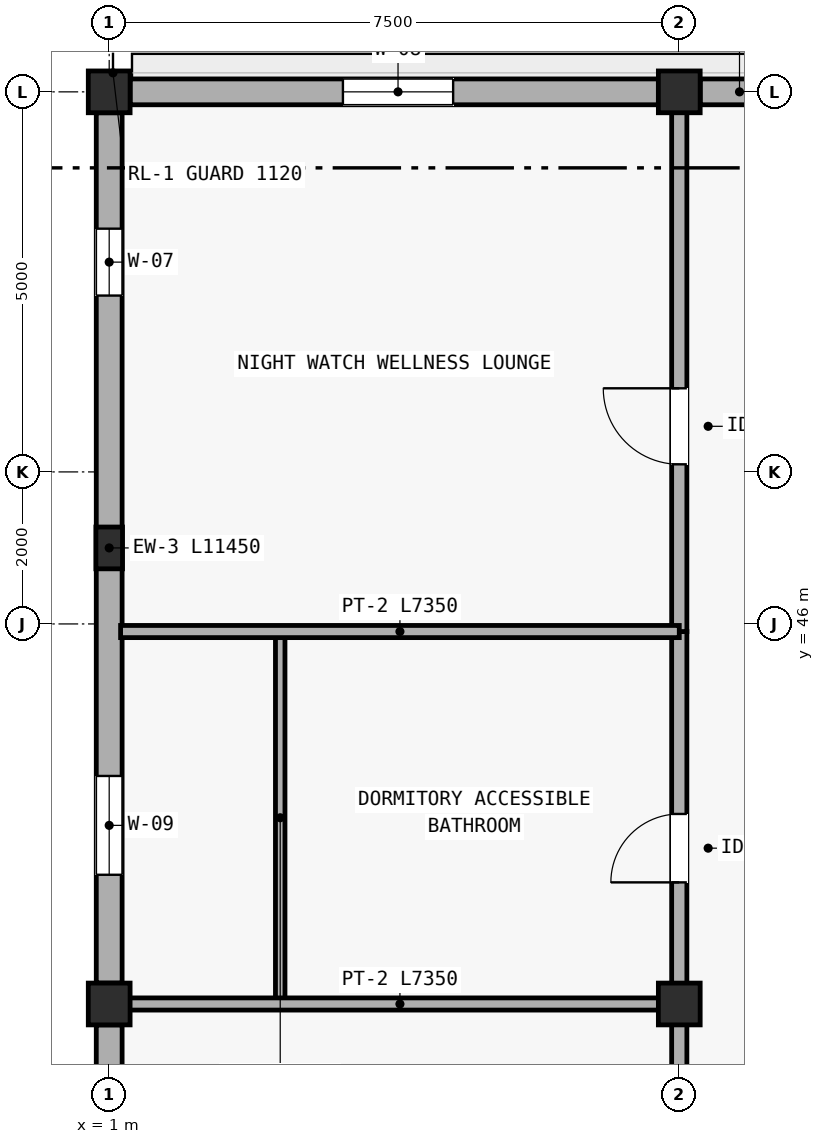
"""IFC4 building model, lengths in metres.
Left out: names, types, materials, properties, quantities, classifications, styles, units other than length and angle.
Written with IfcOpenShell. Run it as: python <this file> out.ifc"""

import sys

from ifc_helpers import new_model, si_unit, direction, frame, frame_2d, origin, origin_2d, place, context, subcontext, project, spatial, rectangle, extrude, element, fill, save


model = new_model("IFC4")
c1 = context("Model", 3, precision=1e-05, world=origin(), true_north=direction((0.0, 1.0)))
c2 = subcontext(c1, "Body", "Model", "MODEL_VIEW")
j1 = project(units=[si_unit("LENGTHUNIT", "METRE"), si_unit("PLANEANGLEUNIT", "RADIAN")], contexts=[c1])
p1 = place(None, origin())
s1 = spatial("IfcSite", under=j1, at=p1, CompositionType="ELEMENT")
p2 = place(p1, origin())
s2 = spatial("IfcBuilding", under=s1, at=p2, CompositionType="ELEMENT")
p3 = place(p2, frame((0.0, 0.0, 9.3)))
s3 = spatial("IfcBuildingStorey", under=s2, at=p3, CompositionType="ELEMENT", Elevation=9.3)
for number, where, z_axis, x_axis in (
    (1, (1.0, 41.0, 0.0), (0.0, 0.0, 1.0), (1.0, 0.0, 0.0)),
    (2, (1.0, 53.0, 0.0), (0.0, 0.0, 1.0), (1.0, 0.0, 0.0)),
    (3, (8.5, 41.0, 0.0), (0.0, 0.0, 1.0), (1.0, 0.0, 0.0)),
    (4, (8.5, 53.0, 0.0), (0.0, 0.0, 1.0), (1.0, 0.0, 0.0)),
):
    element("IfcColumn", number, at=place(p3, frame(where, z_axis=z_axis, x_axis=x_axis)), inside=s3, PredefinedType="COLUMN", context=c2, shape_type="SweptSolid", body=[
        extrude(rectangle(XDim=0.55, YDim=0.55, at=origin_2d()), origin(), (0.0, 0.0, 1.0), 3.45),
    ])
p4 = place(p3, frame((1.0, 47.0, 0.0), z_axis=(0.0, 0.0, 1.0), x_axis=(1.0, 0.0, 0.0)))
e5 = element("IfcColumn", 5, at=p4, inside=s3, PredefinedType="PILASTER", context=c2, shape_type="SweptSolid", body=[
    extrude(rectangle(XDim=0.35, YDim=0.55, at=origin_2d()), origin(), (0.0, 0.0, 1.0), 3.45),
])
p5 = place(p3, frame((8.225, 53.0, 0.0), z_axis=(0.0, 0.0, 1.0), x_axis=(-1.0, 0.0, 0.0)))
e6 = element("IfcWall", 6, at=p5, inside=s3, PredefinedType="STANDARD", context=c2, shape_type="SweptSolid", body=[
    extrude(rectangle(XDim=6.95, YDim=0.34, at=frame_2d((3.475, 0.0))), origin(), (0.0, 0.0, 1.0), 2.75),
])
p6 = place(p5, frame((2.7, 0.0, 0.75)))
e7 = element("IfcOpeningElement", 7, at=p6, cuts=e6, PredefinedType="OPENING", context=c2, shape_type="SweptSolid", body=[
    extrude(rectangle(XDim=1.45, YDim=1.25, at=frame_2d((0.725, 0.625))), frame((0.0, 0.18, 0.0), z_axis=(0.0, -1.0, 0.0), x_axis=(1.0, 0.0, 0.0)), (0.0, 0.0, 1.0), 0.36),
])
p7 = place(p3, frame((12.225, 53.0, 0.0), z_axis=(0.0, 0.0, 1.0), x_axis=(-1.0, 0.0, 0.0)))
e8 = element("IfcWall", 8, at=p7, inside=s3, PredefinedType="STANDARD", context=c2, shape_type="SweptSolid", body=[
    extrude(rectangle(XDim=3.45, YDim=0.34, at=frame_2d((1.725, 0.0))), origin(), (0.0, 0.0, 1.0), 2.75),
])
p8 = place(p7, frame((1.025, 0.0, 0.0)))
e9 = element("IfcOpeningElement", 9, at=p8, cuts=e8, PredefinedType="OPENING", context=c2, shape_type="SweptSolid", body=[
    extrude(rectangle(XDim=1.08, YDim=2.1, at=frame_2d((0.54, 1.05))), frame((0.0, 0.18, 0.0), z_axis=(0.0, -1.0, 0.0), x_axis=(1.0, 0.0, 0.0)), (0.0, 0.0, 1.0), 0.36),
])
p9 = place(p3, frame((1.0, 40.725, 0.0), z_axis=(0.0, 0.0, 1.0), x_axis=(0.0, -1.0, 0.0)))
e10 = element("IfcWall", 10, at=p9, inside=s3, PredefinedType="STANDARD", context=c2, shape_type="SweptSolid", body=[
    extrude(rectangle(XDim=11.45, YDim=0.34, at=frame_2d((5.725, 0.0))), origin(), (0.0, 0.0, 1.0), 2.75),
])
p10 = place(p9, frame((1.525, 0.0, 0.7)))
e11 = element("IfcOpeningElement", 11, at=p10, cuts=e10, PredefinedType="OPENING", context=c2, shape_type="SweptSolid", body=[
    extrude(rectangle(XDim=0.88, YDim=1.5, at=frame_2d((0.44, 0.75))), frame((0.0, 0.18, 0.0), z_axis=(0.0, -1.0, 0.0), x_axis=(1.0, 0.0, 0.0)), (0.0, 0.0, 1.0), 0.36),
])
p11 = place(p9, frame((8.725, 0.0, 0.7)))
e12 = element("IfcOpeningElement", 12, at=p11, cuts=e10, PredefinedType="OPENING", context=c2, shape_type="SweptSolid", body=[
    extrude(rectangle(XDim=1.3, YDim=1.4, at=frame_2d((0.65, 0.7))), frame((0.0, 0.18, 0.0), z_axis=(0.0, -1.0, 0.0), x_axis=(1.0, 0.0, 0.0)), (0.0, 0.0, 1.0), 0.36),
])
p12 = place(p3, frame((1.0, 52.725, 0.0), z_axis=(0.0, 0.0, 1.0), x_axis=(0.0, -1.0, 0.0)))
e13 = element("IfcWall", 13, at=p12, inside=s3, PredefinedType="STANDARD", context=c2, shape_type="SweptSolid", body=[
    extrude(rectangle(XDim=11.45, YDim=0.34, at=frame_2d((5.725, 0.0))), origin(), (0.0, 0.0, 1.0), 2.75),
])
p13 = place(p12, frame((1.525, 0.0, 0.7)))
e14 = element("IfcOpeningElement", 14, at=p13, cuts=e13, PredefinedType="OPENING", context=c2, shape_type="SweptSolid", body=[
    extrude(rectangle(XDim=0.88, YDim=1.5, at=frame_2d((0.44, 0.75))), frame((0.0, 0.18, 0.0), z_axis=(0.0, -1.0, 0.0), x_axis=(1.0, 0.0, 0.0)), (0.0, 0.0, 1.0), 0.36),
])
p14 = place(p12, frame((8.725, 0.0, 0.7)))
e15 = element("IfcOpeningElement", 15, at=p14, cuts=e13, PredefinedType="OPENING", context=c2, shape_type="SweptSolid", body=[
    extrude(rectangle(XDim=1.3, YDim=1.4, at=frame_2d((0.65, 0.7))), frame((0.0, 0.18, 0.0), z_axis=(0.0, -1.0, 0.0), x_axis=(1.0, 0.0, 0.0)), (0.0, 0.0, 1.0), 0.36),
])
p15 = place(p3, frame((8.5, 27.74, 0.0), z_axis=(0.0, 0.0, 1.0), x_axis=(0.0, 1.0, 0.0)))
e16 = element("IfcWall", 16, at=p15, inside=s3, PredefinedType="PARTITIONING", context=c2, shape_type="SweptSolid", body=[
    extrude(rectangle(XDim=13.26, YDim=0.2, at=frame_2d((6.63, 0.0))), origin(), (0.0, 0.0, 1.0), 2.7),
])
p16 = place(p15, frame((3.2, 0.0, 0.0)))
e17 = element("IfcOpeningElement", 17, at=p16, cuts=e16, PredefinedType="OPENING", context=c2, shape_type="SweptSolid", body=[
    extrude(rectangle(XDim=1.02, YDim=2.14, at=frame_2d((0.51, 1.07))), frame((0.0, 0.11, 0.0), z_axis=(0.0, -1.0, 0.0), x_axis=(1.0, 0.0, 0.0)), (0.0, 0.0, 1.0), 0.22),
])
p17 = place(p3, frame((8.5, 41.0, 0.0), z_axis=(0.0, 0.0, 1.0), x_axis=(0.0, 1.0, 0.0)))
e18 = element("IfcWall", 18, at=p17, inside=s3, PredefinedType="PARTITIONING", context=c2, shape_type="SweptSolid", body=[
    extrude(rectangle(XDim=4.9, YDim=0.2, at=frame_2d((2.45, 0.0))), origin(), (0.0, 0.0, 1.0), 2.7),
])
p18 = place(p17, frame((1.6, 0.0, 0.0)))
e19 = element("IfcOpeningElement", 19, at=p18, cuts=e18, PredefinedType="OPENING", context=c2, shape_type="SweptSolid", body=[
    extrude(rectangle(XDim=0.9, YDim=2.08, at=frame_2d((0.45, 1.04))), frame((0.0, 0.11, 0.0), z_axis=(0.0, -1.0, 0.0), x_axis=(1.0, 0.0, 0.0)), (0.0, 0.0, 1.0), 0.22),
])
p19 = place(p3, frame((3.25, 41.0, 0.0), z_axis=(0.0, 0.0, 1.0), x_axis=(0.0, 1.0, 0.0)))
e20 = element("IfcWall", 20, at=p19, inside=s3, PredefinedType="PARTITIONING", context=c2, shape_type="SweptSolid", body=[
    extrude(rectangle(XDim=4.9, YDim=0.125, at=frame_2d((2.45, 0.0))), origin(), (0.0, 0.0, 1.0), 2.7),
])
p20 = place(p3, frame((8.5, 45.9, 0.0), z_axis=(0.0, 0.0, 1.0), x_axis=(0.0, 1.0, 0.0)))
e21 = element("IfcWall", 21, at=p20, inside=s3, PredefinedType="PARTITIONING", context=c2, shape_type="SweptSolid", body=[
    extrude(rectangle(XDim=6.95, YDim=0.2, at=frame_2d((3.475, 0.0))), origin(), (0.0, 0.0, 1.0), 2.7),
])
p21 = place(p20, frame((2.2, 0.0, 0.0)))
e22 = element("IfcOpeningElement", 22, at=p21, cuts=e21, PredefinedType="OPENING", context=c2, shape_type="SweptSolid", body=[
    extrude(rectangle(XDim=1.0, YDim=2.12, at=frame_2d((0.5, 1.06))), frame((0.0, 0.11, 0.0), z_axis=(0.0, -1.0, 0.0), x_axis=(1.0, 0.0, 0.0)), (0.0, 0.0, 1.0), 0.22),
])
for number, where, z_axis, x_axis in (
    (23, (1.15, 41.0, 0.0), (0.0, 0.0, 1.0), (1.0, 0.0, 0.0)),
    (24, (1.15, 45.9, 0.0), (0.0, 0.0, 1.0), (1.0, 0.0, 0.0)),
):
    element("IfcWall", number, at=place(p3, frame(where, z_axis=z_axis, x_axis=x_axis)), inside=s3, PredefinedType="PARTITIONING", context=c2, shape_type="SweptSolid", body=[
        extrude(rectangle(XDim=7.35, YDim=0.16, at=frame_2d((3.675, 0.0))), origin(), (0.0, 0.0, 1.0), 2.7),
    ])
p22 = place(p6, origin())
e25 = element("IfcWindow", 25, at=p22, inside=s3, PartitioningType="DOUBLE_PANEL_HORIZONTAL", PredefinedType="WINDOW", context=c2, shape_type="SweptSolid", body=[
    extrude(rectangle(XDim=1.45, YDim=1.25, at=frame_2d((0.725, 0.625))), frame((0.0, 0.03, 0.0), z_axis=(0.0, -1.0, 0.0), x_axis=(1.0, 0.0, 0.0)), (0.0, 0.0, 1.0), 0.06),
])
fill(e7, e25)
p23 = place(p13, origin())
e26 = element("IfcWindow", 26, at=p23, inside=s3, PartitioningType="SINGLE_PANEL", PredefinedType="WINDOW", context=c2, shape_type="SweptSolid", body=[
    extrude(rectangle(XDim=0.88, YDim=1.5, at=frame_2d((0.44, 0.75))), frame((0.0, 0.03, 0.0), z_axis=(0.0, -1.0, 0.0), x_axis=(1.0, 0.0, 0.0)), (0.0, 0.0, 1.0), 0.06),
])
fill(e14, e26)
p24 = place(p14, origin())
e27 = element("IfcWindow", 27, at=p24, inside=s3, PartitioningType="SINGLE_PANEL", PredefinedType="WINDOW", context=c2, shape_type="SweptSolid", body=[
    extrude(rectangle(XDim=1.3, YDim=1.4, at=frame_2d((0.65, 0.7))), frame((0.0, 0.03, 0.0), z_axis=(0.0, -1.0, 0.0), x_axis=(1.0, 0.0, 0.0)), (0.0, 0.0, 1.0), 0.06),
])
fill(e15, e27)
p25 = place(p18, origin())
e28 = element("IfcDoor", 28, at=p25, inside=s3, OperationType="SINGLE_SWING_LEFT", PredefinedType="DOOR", context=c2, shape_type="SweptSolid", body=[
    extrude(rectangle(XDim=0.9, YDim=2.08, at=frame_2d((0.45, 1.04))), frame((0.0, 0.025, 0.0), z_axis=(0.0, -1.0, 0.0), x_axis=(1.0, 0.0, 0.0)), (0.0, 0.0, 1.0), 0.05),
])
fill(e19, e28)
p26 = place(p21, origin())
e29 = element("IfcDoor", 29, at=p26, inside=s3, OperationType="SINGLE_SWING_RIGHT", PredefinedType="DOOR", context=c2, shape_type="SweptSolid", body=[
    extrude(rectangle(XDim=1.0, YDim=2.12, at=frame_2d((0.5, 1.06))), frame((0.0, 0.025, 0.0), z_axis=(0.0, -1.0, 0.0), x_axis=(1.0, 0.0, 0.0)), (0.0, 0.0, 1.0), 0.05),
])
fill(e22, e29)
save(model, sys.argv[1])
